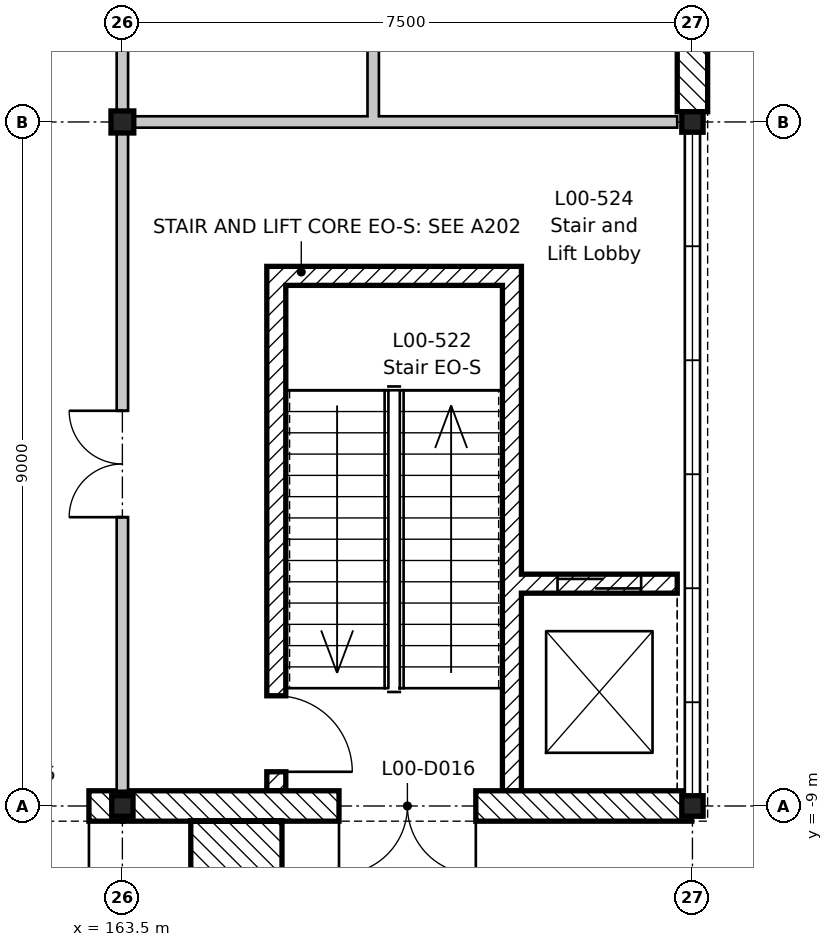
"""IFC4 building model, lengths in metres.
Left out: names, types, materials, properties, quantities, classifications, styles, units other than length and angle.
Written with IfcOpenShell. Run it as: python <this file> out.ifc"""

import sys

from ifc_helpers import new_model, si_unit, direction, frame, frame_2d, origin, origin_2d, place, context, subcontext, project, spatial, rectangle, i_section, extrude, element, fill, save


model = new_model("IFC4")
c1 = context("Model", 3, precision=1e-05, world=origin(), true_north=direction((0.0, 1.0)))
c2 = subcontext(c1, "Body", "Model", "MODEL_VIEW")
j1 = project(units=[si_unit("LENGTHUNIT", "METRE"), si_unit("PLANEANGLEUNIT", "RADIAN")], contexts=[c1])
p1 = place(None, origin())
s1 = spatial("IfcSite", under=j1, at=p1, CompositionType="ELEMENT")
p2 = place(p1, origin())
s2 = spatial("IfcBuilding", under=s1, at=p2, CompositionType="ELEMENT")
p3 = place(p2, origin())
s3 = spatial("IfcBuildingStorey", under=s2, at=p3, CompositionType="ELEMENT", Elevation=0.0)
p4 = place(p3, frame((163.5, -9.0, -0.6), z_axis=(0.0, 0.0, 1.0), x_axis=(1.0, 0.0, 0.0)))
e1 = element("IfcColumn", 1, at=p4, inside=s3, PredefinedType="COLUMN", context=c2, shape_type="SweptSolid", body=[
    extrude(i_section(OverallWidth=0.28, OverallDepth=0.27, WebThickness=0.008, FlangeThickness=0.013, FilletRadius=0.024, at=origin_2d()), origin(), (0.0, 0.0, 1.0), 5.8),
])
p5 = place(p3, frame((163.5, 0.0, -0.6), z_axis=(0.0, 0.0, 1.0), x_axis=(1.0, 0.0, 0.0)))
e2 = element("IfcColumn", 2, at=p5, inside=s3, PredefinedType="COLUMN", context=c2, shape_type="SweptSolid", body=[
    extrude(i_section(OverallWidth=0.3, OverallDepth=0.29, WebThickness=0.009, FlangeThickness=0.014, FilletRadius=0.027, at=origin_2d()), origin(), (0.0, 0.0, 1.0), 5.8),
])
for number, where, z_axis, x_axis in (
    (3, (171.0, -9.0, -0.6), (0.0, 0.0, 1.0), (1.0, 0.0, 0.0)),
    (4, (171.0, 0.0, -0.6), (0.0, 0.0, 1.0), (1.0, 0.0, 0.0)),
):
    element("IfcColumn", number, at=place(p3, frame(where, z_axis=z_axis, x_axis=x_axis)), inside=s3, PredefinedType="COLUMN", context=c2, shape_type="SweptSolid", body=[
        extrude(i_section(OverallWidth=0.28, OverallDepth=0.27, WebThickness=0.008, FlangeThickness=0.013, FilletRadius=0.024, at=origin_2d()), origin(), (0.0, 0.0, 1.0), 5.8),
    ])
p6 = place(p3, frame((168.625, -8.8, 0.0), z_axis=(0.0, 0.0, 1.0), x_axis=(0.0, 1.0, 0.0)))
e5 = element("IfcWall", 5, at=p6, inside=s3, PredefinedType="SHEAR", context=c2, shape_type="SweptSolid", body=[
    extrude(rectangle(XDim=6.9, YDim=0.25, at=frame_2d((3.45, 0.0))), origin(), (0.0, 0.0, 1.0), 5.2),
])
p7 = place(p3, frame((165.525, -8.8, 0.0), z_axis=(0.0, 0.0, 1.0), x_axis=(0.0, 1.0, 0.0)))
e6 = element("IfcWall", 6, at=p7, inside=s3, PredefinedType="SHEAR", context=c2, shape_type="SweptSolid", body=[
    extrude(rectangle(XDim=6.9, YDim=0.25, at=frame_2d((3.45, 0.0))), origin(), (0.0, 0.0, 1.0), 5.2),
])
p8 = place(p7, frame((0.25, 0.0, 0.0)))
e7 = element("IfcOpeningElement", 7, at=p8, cuts=e6, PredefinedType="OPENING", context=c2, shape_type="SweptSolid", body=[
    extrude(rectangle(XDim=1.0, YDim=2.1, at=frame_2d((0.5, 1.05))), frame((0.0, 0.135, 0.0), z_axis=(0.0, -1.0, 0.0), x_axis=(1.0, 0.0, 0.0)), (0.0, 0.0, 1.0), 0.27),
])
p9 = place(p3, frame((165.65, -2.025, 0.0), z_axis=(0.0, 0.0, 1.0), x_axis=(1.0, 0.0, 0.0)))
e8 = element("IfcWall", 8, at=p9, inside=s3, PredefinedType="SHEAR", context=c2, shape_type="SweptSolid", body=[
    extrude(rectangle(XDim=2.85, YDim=0.25, at=frame_2d((1.425, 0.0))), origin(), (0.0, 0.0, 1.0), 5.2),
])
p10 = place(p3, frame((168.75, -6.075, 0.0), z_axis=(0.0, 0.0, 1.0), x_axis=(1.0, 0.0, 0.0)))
e9 = element("IfcWall", 9, at=p10, inside=s3, PredefinedType="SHEAR", context=c2, shape_type="SweptSolid", body=[
    extrude(rectangle(XDim=2.05, YDim=0.25, at=frame_2d((1.025, 0.0))), origin(), (0.0, 0.0, 1.0), 5.2),
])
p11 = place(p10, frame((0.475, 0.0, 0.0)))
e10 = element("IfcOpeningElement", 10, at=p11, cuts=e9, PredefinedType="OPENING", context=c2, shape_type="SweptSolid", body=[
    extrude(rectangle(XDim=1.1, YDim=2.1, at=frame_2d((0.55, 1.05))), frame((0.0, 0.135, 0.0), z_axis=(0.0, -1.0, 0.0), x_axis=(1.0, 0.0, 0.0)), (0.0, 0.0, 1.0), 0.27),
])
p12 = place(p3, frame((168.625, -8.8, -1.5), z_axis=(0.0, 0.0, 1.0), x_axis=(0.0, 1.0, 0.0)))
e11 = element("IfcWall", 11, at=p12, inside=s3, PredefinedType="SHEAR", context=c2, shape_type="SweptSolid", body=[
    extrude(rectangle(XDim=2.85, YDim=0.25, at=frame_2d((1.425, 0.0))), origin(), (0.0, 0.0, 1.0), 1.5),
])
p13 = place(p3, frame((168.75, -6.075, -1.5), z_axis=(0.0, 0.0, 1.0), x_axis=(1.0, 0.0, 0.0)))
e12 = element("IfcWall", 12, at=p13, inside=s3, PredefinedType="SHEAR", context=c2, shape_type="SweptSolid", body=[
    extrude(rectangle(XDim=2.05, YDim=0.25, at=frame_2d((1.025, 0.0))), origin(), (0.0, 0.0, 1.0), 1.5),
])
p14 = place(p3, frame((171.0, 8.865, 0.0), z_axis=(0.0, 0.0, 1.0), x_axis=(0.0, -1.0, 0.0)))
e13 = element("IfcWall", 13, at=p14, inside=s3, PredefinedType="STANDARD", context=c2, shape_type="SweptSolid", body=[
    extrude(rectangle(XDim=8.73, YDim=0.4, at=frame_2d((4.365, 0.0))), origin(), (0.0, 0.0, 1.0), 4.8),
])
p15 = place(p14, frame((7.065, 0.0, 1.5)))
e14 = element("IfcOpeningElement", 14, at=p15, cuts=e13, PredefinedType="OPENING", context=c2, shape_type="SweptSolid", body=[
    extrude(rectangle(XDim=0.6, YDim=1.2, at=frame_2d((0.3, 0.6))), frame((0.0, 0.21, 0.0), z_axis=(0.0, -1.0, 0.0), x_axis=(1.0, 0.0, 0.0)), (0.0, 0.0, 1.0), 0.42),
])
p16 = place(p14, frame((4.065, 0.0, 1.5)))
e15 = element("IfcOpeningElement", 15, at=p16, cuts=e13, PredefinedType="OPENING", context=c2, shape_type="SweptSolid", body=[
    extrude(rectangle(XDim=0.6, YDim=1.2, at=frame_2d((0.3, 0.6))), frame((0.0, 0.21, 0.0), z_axis=(0.0, -1.0, 0.0), x_axis=(1.0, 0.0, 0.0)), (0.0, 0.0, 1.0), 0.42),
])
p17 = place(p14, frame((1.065, 0.0, 1.5)))
e16 = element("IfcOpeningElement", 16, at=p17, cuts=e13, PredefinedType="OPENING", context=c2, shape_type="SweptSolid", body=[
    extrude(rectangle(XDim=0.6, YDim=1.2, at=frame_2d((0.3, 0.6))), frame((0.0, 0.21, 0.0), z_axis=(0.0, -1.0, 0.0), x_axis=(1.0, 0.0, 0.0)), (0.0, 0.0, 1.0), 0.42),
])
p18 = place(p3, frame((163.491, -9.0, 0.0), z_axis=(0.0, 0.0, 1.0), x_axis=(-1.0, 0.0, 0.0)))
e17 = element("IfcWall", 17, at=p18, inside=s3, PredefinedType="STANDARD", context=c2, shape_type="SweptSolid", body=[
    extrude(rectangle(XDim=2.982, YDim=0.4, at=frame_2d((1.491, 0.0))), origin(), (0.0, 0.0, 1.0), 5.0),
])
p19 = place(p18, frame((0.431, 0.0, 0.0)))
e18 = element("IfcOpeningElement", 18, at=p19, cuts=e17, PredefinedType="OPENING", context=c2, shape_type="SweptSolid", body=[
    extrude(rectangle(XDim=2.12, YDim=2.4, at=frame_2d((1.06, 1.2))), frame((0.0, 0.21, 0.0), z_axis=(0.0, -1.0, 0.0), x_axis=(1.0, 0.0, 0.0)), (0.0, 0.0, 1.0), 0.42),
])
p20 = place(p3, frame((170.991, -9.0, 0.0), z_axis=(0.0, 0.0, 1.0), x_axis=(-1.0, 0.0, 0.0)))
e19 = element("IfcWall", 19, at=p20, inside=s3, PredefinedType="STANDARD", context=c2, shape_type="SweptSolid", body=[
    extrude(rectangle(XDim=7.482, YDim=0.4, at=frame_2d((3.741, 0.0))), origin(), (0.0, 0.0, 1.0), 4.87),
])
p21 = place(p20, frame((2.841, 0.0, 0.0)))
e20 = element("IfcOpeningElement", 20, at=p21, cuts=e19, PredefinedType="OPENING", context=c2, shape_type="SweptSolid", body=[
    extrude(rectangle(XDim=1.8, YDim=2.1, at=frame_2d((0.9, 1.05))), frame((0.0, 0.21, 0.0), z_axis=(0.0, -1.0, 0.0), x_axis=(1.0, 0.0, 0.0)), (0.0, 0.0, 1.0), 0.42),
])
p22 = place(p3, frame((164.4, -9.8, 0.0), z_axis=(0.0, 0.0, 1.0), x_axis=(1.0, 0.0, 0.0)))
e21 = element("IfcWall", 21, at=p22, inside=s3, PredefinedType="STANDARD", context=c2, shape_type="SweptSolid", body=[
    extrude(rectangle(XDim=1.2, YDim=1.2, at=frame_2d((0.6, 0.0))), origin(), (0.0, 0.0, 1.0), 5.4),
])
p23 = place(p3, frame((163.575, 0.0, 0.0), z_axis=(0.0, 0.0, 1.0), x_axis=(1.0, 0.0, 0.0)))
e22 = element("IfcWall", 22, at=p23, inside=s3, PredefinedType="PARTITIONING", context=c2, shape_type="SweptSolid", body=[
    extrude(rectangle(XDim=7.225, YDim=0.15, at=frame_2d((3.613, 0.0))), origin(), (0.0, 0.0, 1.0), 4.85),
])
p24 = place(p3, frame((163.5, -8.8, 0.0), z_axis=(0.0, 0.0, 1.0), x_axis=(0.0, 1.0, 0.0)))
e23 = element("IfcWall", 23, at=p24, inside=s3, PredefinedType="PARTITIONING", context=c2, shape_type="SweptSolid", body=[
    extrude(rectangle(XDim=62.6, YDim=0.15, at=frame_2d((31.3, 0.0))), origin(), (0.0, 0.0, 1.0), 4.68),
])
p25 = place(p24, frame((20.3, 0.0, 0.0)))
e24 = element("IfcOpeningElement", 24, at=p25, cuts=e23, PredefinedType="OPENING", context=c2, shape_type="SweptSolid", body=[
    extrude(rectangle(XDim=1.0, YDim=2.1, at=frame_2d((0.5, 1.05))), frame((0.0, 0.085, 0.0), z_axis=(0.0, -1.0, 0.0), x_axis=(1.0, 0.0, 0.0)), (0.0, 0.0, 1.0), 0.17),
])
p26 = place(p24, frame((24.8, 0.0, 0.0)))
e25 = element("IfcOpeningElement", 25, at=p26, cuts=e23, PredefinedType="OPENING", context=c2, shape_type="SweptSolid", body=[
    extrude(rectangle(XDim=1.0, YDim=2.1, at=frame_2d((0.5, 1.05))), frame((0.0, 0.085, 0.0), z_axis=(0.0, -1.0, 0.0), x_axis=(1.0, 0.0, 0.0)), (0.0, 0.0, 1.0), 0.17),
])
p27 = place(p24, frame((27.8, 0.0, 0.0)))
e26 = element("IfcOpeningElement", 26, at=p27, cuts=e23, PredefinedType="OPENING", context=c2, shape_type="SweptSolid", body=[
    extrude(rectangle(XDim=1.0, YDim=2.1, at=frame_2d((0.5, 1.05))), frame((0.0, 0.085, 0.0), z_axis=(0.0, -1.0, 0.0), x_axis=(1.0, 0.0, 0.0)), (0.0, 0.0, 1.0), 0.17),
])
p28 = place(p24, frame((32.3, 0.0, 0.0)))
e27 = element("IfcOpeningElement", 27, at=p28, cuts=e23, PredefinedType="OPENING", context=c2, shape_type="SweptSolid", body=[
    extrude(rectangle(XDim=1.0, YDim=2.1, at=frame_2d((0.5, 1.05))), frame((0.0, 0.085, 0.0), z_axis=(0.0, -1.0, 0.0), x_axis=(1.0, 0.0, 0.0)), (0.0, 0.0, 1.0), 0.17),
])
p29 = place(p24, frame((45.8, 0.0, 0.0)))
e28 = element("IfcOpeningElement", 28, at=p29, cuts=e23, PredefinedType="OPENING", context=c2, shape_type="SweptSolid", body=[
    extrude(rectangle(XDim=1.0, YDim=2.1, at=frame_2d((0.5, 1.05))), frame((0.0, 0.085, 0.0), z_axis=(0.0, -1.0, 0.0), x_axis=(1.0, 0.0, 0.0)), (0.0, 0.0, 1.0), 0.17),
])
p30 = place(p24, frame((50.3, 0.0, 0.0)))
e29 = element("IfcOpeningElement", 29, at=p30, cuts=e23, PredefinedType="OPENING", context=c2, shape_type="SweptSolid", body=[
    extrude(rectangle(XDim=1.0, YDim=2.1, at=frame_2d((0.5, 1.05))), frame((0.0, 0.085, 0.0), z_axis=(0.0, -1.0, 0.0), x_axis=(1.0, 0.0, 0.0)), (0.0, 0.0, 1.0), 0.17),
])
p31 = place(p24, frame((12.6, 0.0, 0.0)))
e30 = element("IfcOpeningElement", 30, at=p31, cuts=e23, PredefinedType="OPENING", context=c2, shape_type="SweptSolid", body=[
    extrude(rectangle(XDim=1.4, YDim=2.1, at=frame_2d((0.7, 1.05))), frame((0.0, 0.085, 0.0), z_axis=(0.0, -1.0, 0.0), x_axis=(1.0, 0.0, 0.0)), (0.0, 0.0, 1.0), 0.17),
])
p32 = place(p24, frame((3.6, 0.0, 0.0)))
e31 = element("IfcOpeningElement", 31, at=p32, cuts=e23, PredefinedType="OPENING", context=c2, shape_type="SweptSolid", body=[
    extrude(rectangle(XDim=1.4, YDim=2.1, at=frame_2d((0.7, 1.05))), frame((0.0, 0.085, 0.0), z_axis=(0.0, -1.0, 0.0), x_axis=(1.0, 0.0, 0.0)), (0.0, 0.0, 1.0), 0.17),
])
p33 = place(p24, frame((57.6, 0.0, 0.0)))
e32 = element("IfcOpeningElement", 32, at=p33, cuts=e23, PredefinedType="OPENING", context=c2, shape_type="SweptSolid", body=[
    extrude(rectangle(XDim=1.4, YDim=2.1, at=frame_2d((0.7, 1.05))), frame((0.0, 0.085, 0.0), z_axis=(0.0, -1.0, 0.0), x_axis=(1.0, 0.0, 0.0)), (0.0, 0.0, 1.0), 0.17),
])
p34 = place(p24, frame((36.75, 0.0, 0.0)))
e33 = element("IfcOpeningElement", 33, at=p34, cuts=e23, PredefinedType="OPENING", context=c2, shape_type="SweptSolid", body=[
    extrude(rectangle(XDim=1.0, YDim=2.1, at=frame_2d((0.5, 1.05))), frame((0.0, 0.085, 0.0), z_axis=(0.0, -1.0, 0.0), x_axis=(1.0, 0.0, 0.0)), (0.0, 0.0, 1.0), 0.17),
])
p35 = place(p24, frame((42.65, 0.0, 0.0)))
e34 = element("IfcOpeningElement", 34, at=p35, cuts=e23, PredefinedType="OPENING", context=c2, shape_type="SweptSolid", body=[
    extrude(rectangle(XDim=1.4, YDim=2.1, at=frame_2d((0.7, 1.05))), frame((0.0, 0.085, 0.0), z_axis=(0.0, -1.0, 0.0), x_axis=(1.0, 0.0, 0.0)), (0.0, 0.0, 1.0), 0.17),
])
p36 = place(p3, frame((166.8, 0.075, 0.0), z_axis=(0.0, 0.0, 1.0), x_axis=(0.0, 1.0, 0.0)))
e35 = element("IfcWall", 35, at=p36, inside=s3, PredefinedType="PARTITIONING", context=c2, shape_type="SweptSolid", body=[
    extrude(rectangle(XDim=8.85, YDim=0.15, at=frame_2d((4.425, 0.0))), origin(), (0.0, 0.0, 1.0), 5.2),
])
p37 = place(p36, frame((0.975, 0.0, 0.0)))
e36 = element("IfcOpeningElement", 36, at=p37, cuts=e35, PredefinedType="OPENING", context=c2, shape_type="SweptSolid", body=[
    extrude(rectangle(XDim=0.9, YDim=2.1, at=frame_2d((0.45, 1.05))), frame((0.0, 0.085, 0.0), z_axis=(0.0, -1.0, 0.0), x_axis=(1.0, 0.0, 0.0)), (0.0, 0.0, 1.0), 0.17),
])
p38 = place(p36, frame((3.975, 0.0, 0.0)))
e37 = element("IfcOpeningElement", 37, at=p38, cuts=e35, PredefinedType="OPENING", context=c2, shape_type="SweptSolid", body=[
    extrude(rectangle(XDim=0.9, YDim=2.1, at=frame_2d((0.45, 1.05))), frame((0.0, 0.085, 0.0), z_axis=(0.0, -1.0, 0.0), x_axis=(1.0, 0.0, 0.0)), (0.0, 0.0, 1.0), 0.17),
])
p39 = place(p36, frame((6.925, 0.0, 0.0)))
e38 = element("IfcOpeningElement", 38, at=p39, cuts=e35, PredefinedType="OPENING", context=c2, shape_type="SweptSolid", body=[
    extrude(rectangle(XDim=1.0, YDim=2.1, at=frame_2d((0.5, 1.05))), frame((0.0, 0.085, 0.0), z_axis=(0.0, -1.0, 0.0), x_axis=(1.0, 0.0, 0.0)), (0.0, 0.0, 1.0), 0.17),
])
p40 = place(p19, origin())
e39 = element("IfcDoor", 39, at=p40, inside=s3, OperationType="DOUBLE_DOOR_SINGLE_SWING", PredefinedType="DOOR", context=c2, shape_type="SweptSolid", body=[
    extrude(rectangle(XDim=2.12, YDim=2.4, at=frame_2d((1.06, 1.2))), frame((0.0, 0.025, 0.0), z_axis=(0.0, -1.0, 0.0), x_axis=(1.0, 0.0, 0.0)), (0.0, 0.0, 1.0), 0.05),
])
fill(e18, e39)
p41 = place(p21, origin())
e40 = element("IfcDoor", 40, at=p41, inside=s3, OperationType="DOUBLE_DOOR_SINGLE_SWING", PredefinedType="DOOR", context=c2, shape_type="SweptSolid", body=[
    extrude(rectangle(XDim=1.8, YDim=2.1, at=frame_2d((0.9, 1.05))), frame((0.0, 0.025, 0.0), z_axis=(0.0, -1.0, 0.0), x_axis=(1.0, 0.0, 0.0)), (0.0, 0.0, 1.0), 0.05),
])
fill(e20, e40)
p42 = place(p8, frame((1.0, 0.0, 0.0), z_axis=(0.0, 0.0, 1.0), x_axis=(-1.0, 0.0, 0.0)))
e41 = element("IfcDoor", 41, at=p42, inside=s3, OperationType="SINGLE_SWING_RIGHT", PredefinedType="DOOR", context=c2, shape_type="SweptSolid", body=[
    extrude(rectangle(XDim=1.0, YDim=2.1, at=frame_2d((0.5, 1.05))), frame((0.0, 0.025, 0.0), z_axis=(0.0, -1.0, 0.0), x_axis=(1.0, 0.0, 0.0)), (0.0, 0.0, 1.0), 0.05),
])
fill(e7, e41)
p43 = place(p32, origin())
e42 = element("IfcDoor", 42, at=p43, inside=s3, OperationType="DOUBLE_DOOR_SINGLE_SWING", PredefinedType="DOOR", context=c2, shape_type="SweptSolid", body=[
    extrude(rectangle(XDim=1.4, YDim=2.1, at=frame_2d((0.7, 1.05))), frame((0.0, 0.025, 0.0), z_axis=(0.0, -1.0, 0.0), x_axis=(1.0, 0.0, 0.0)), (0.0, 0.0, 1.0), 0.05),
])
fill(e31, e42)
p44 = place(p11, origin())
e43 = element("IfcDoor", 43, at=p44, inside=s3, OperationType="SLIDING_TO_LEFT", PredefinedType="DOOR", context=c2, shape_type="SweptSolid", body=[
    extrude(rectangle(XDim=1.1, YDim=2.1, at=frame_2d((0.55, 1.05))), frame((0.0, 0.025, 0.0), z_axis=(0.0, -1.0, 0.0), x_axis=(1.0, 0.0, 0.0)), (0.0, 0.0, 1.0), 0.05),
])
fill(e10, e43)
save(model, sys.argv[1])
